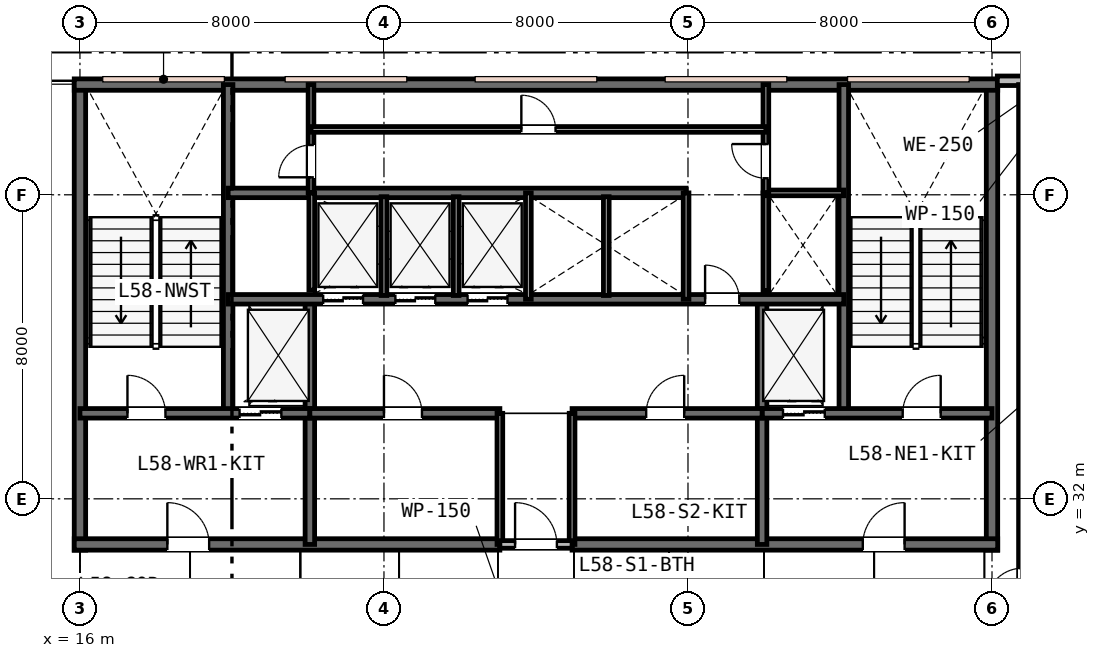
"""IFC4 building model, lengths in metres.
Left out: names, types, materials, properties, quantities, classifications, styles, units other than length and angle.
Written with IfcOpenShell. Run it as: python <this file> out.ifc"""

import sys

from ifc_helpers import new_model, si_unit, direction, frame, frame_2d, origin, place, context, subcontext, project, spatial, rectangle, extrude, element, fill, save


model = new_model("IFC4")
c1 = context("Model", 3, precision=1e-05, world=origin(), true_north=direction((0.0, 1.0)))
c2 = subcontext(c1, "Body", "Model", "MODEL_VIEW")
j1 = project(units=[si_unit("LENGTHUNIT", "METRE"), si_unit("PLANEANGLEUNIT", "RADIAN")], contexts=[c1])
p1 = place(None, origin())
s1 = spatial("IfcSite", under=j1, at=p1, CompositionType="ELEMENT")
p2 = place(p1, origin())
s2 = spatial("IfcBuilding", under=s1, at=p2, CompositionType="ELEMENT")
p3 = place(p2, frame((0.0, 0.0, 226.0)))
s3 = spatial("IfcBuildingStorey", under=s2, at=p3, CompositionType="ELEMENT", Elevation=226.0)
for number, where, z_axis, x_axis in (
    (1, (16.0, 30.65, 0.0), (0.0, 0.0, 1.0), (0.0, 1.0, 0.0)),
    (2, (40.0, 30.65, 0.0), (0.0, 0.0, 1.0), (0.0, 1.0, 0.0)),
):
    element("IfcWall", number, at=place(p3, frame(where, z_axis=z_axis, x_axis=x_axis)), inside=s3, PredefinedType="SHEAR", context=c2, shape_type="SweptSolid", body=[
        extrude(rectangle(XDim=12.3, YDim=0.3, at=frame_2d((6.15, 0.0))), origin(), (0.0, 0.0, 1.0), 3.8),
    ])
p4 = place(p3, frame((15.85, 42.9, 0.0), z_axis=(0.0, 0.0, 1.0), x_axis=(1.0, 0.0, 0.0)))
e3 = element("IfcWall", 3, at=p4, inside=s3, PredefinedType="SHEAR", context=c2, shape_type="SweptSolid", body=[
    extrude(rectangle(XDim=24.3, YDim=0.3, at=frame_2d((12.15, 0.0))), origin(), (0.0, 0.0, 1.0), 3.8),
])
p5 = place(p3, frame((15.85, 30.8, 0.0), z_axis=(0.0, 0.0, 1.0), x_axis=(1.0, 0.0, 0.0)))
e4 = element("IfcWall", 4, at=p5, inside=s3, PredefinedType="SHEAR", context=c2, shape_type="SweptSolid", body=[
    extrude(rectangle(XDim=11.2, YDim=0.3, at=frame_2d((5.6, 0.0))), origin(), (0.0, 0.0, 1.0), 3.8),
])
p6 = place(p5, frame((2.45, 0.0, 0.0)))
e5 = element("IfcOpeningElement", 5, at=p6, cuts=e4, PredefinedType="OPENING", context=c2, shape_type="SweptSolid", body=[
    extrude(rectangle(XDim=1.1, YDim=2.15, at=frame_2d((0.55, 1.075))), frame((0.0, 0.16, 0.0), z_axis=(0.0, -1.0, 0.0), x_axis=(1.0, 0.0, 0.0)), (0.0, 0.0, 1.0), 0.32),
])
p7 = place(p3, frame((28.95, 30.8, 0.0), z_axis=(0.0, 0.0, 1.0), x_axis=(1.0, 0.0, 0.0)))
e6 = element("IfcWall", 6, at=p7, inside=s3, PredefinedType="SHEAR", context=c2, shape_type="SweptSolid", body=[
    extrude(rectangle(XDim=11.2, YDim=0.3, at=frame_2d((5.6, 0.0))), origin(), (0.0, 0.0, 1.0), 3.8),
])
p8 = place(p7, frame((7.65, 0.0, 0.0)))
e7 = element("IfcOpeningElement", 7, at=p8, cuts=e6, PredefinedType="OPENING", context=c2, shape_type="SweptSolid", body=[
    extrude(rectangle(XDim=1.1, YDim=2.15, at=frame_2d((0.55, 1.075))), frame((0.0, 0.16, 0.0), z_axis=(0.0, -1.0, 0.0), x_axis=(1.0, 0.0, 0.0)), (0.0, 0.0, 1.0), 0.32),
])
for number, where, z_axis, x_axis in (
    (8, (19.9, 34.25, 0.0), (0.0, 0.0, 1.0), (0.0, 1.0, 0.0)),
    (9, (36.1, 34.25, 0.0), (0.0, 0.0, 1.0), (0.0, 1.0, 0.0)),
):
    element("IfcWall", number, at=place(p3, frame(where, z_axis=z_axis, x_axis=x_axis)), inside=s3, PredefinedType="SHEAR", context=c2, shape_type="SweptSolid", body=[
        extrude(rectangle(XDim=8.65, YDim=0.25, at=frame_2d((4.325, 0.0))), origin(), (0.0, 0.0, 1.0), 3.8),
    ])
for number, where, z_axis, x_axis in (
    (10, (22.05, 30.8, 0.0), (0.0, 0.0, 1.0), (0.0, 1.0, 0.0)),
    (11, (33.95, 30.8, 0.0), (0.0, 0.0, 1.0), (0.0, 1.0, 0.0)),
):
    element("IfcWall", number, at=place(p3, frame(where, z_axis=z_axis, x_axis=x_axis)), inside=s3, PredefinedType="SHEAR", context=c2, shape_type="SweptSolid", body=[
        extrude(rectangle(XDim=6.45, YDim=0.25, at=frame_2d((3.225, 0.0))), origin(), (0.0, 0.0, 1.0), 3.8),
    ])
p9 = place(p3, frame((16.0, 34.25, 0.0), z_axis=(0.0, 0.0, 1.0), x_axis=(1.0, 0.0, 0.0)))
e12 = element("IfcWall", 12, at=p9, inside=s3, PredefinedType="SHEAR", context=c2, shape_type="SweptSolid", body=[
    extrude(rectangle(XDim=6.05, YDim=0.25, at=frame_2d((3.025, 0.0))), origin(), (0.0, 0.0, 1.0), 3.8),
])
p10 = place(p9, frame((1.25, 0.0, 0.0)))
e13 = element("IfcOpeningElement", 13, at=p10, cuts=e12, PredefinedType="OPENING", context=c2, shape_type="SweptSolid", body=[
    extrude(rectangle(XDim=1.0, YDim=2.15, at=frame_2d((0.5, 1.075))), frame((0.0, 0.135, 0.0), z_axis=(0.0, -1.0, 0.0), x_axis=(1.0, 0.0, 0.0)), (0.0, 0.0, 1.0), 0.27),
])
p11 = place(p9, frame((4.2, 0.0, 0.0)))
e14 = element("IfcOpeningElement", 14, at=p11, cuts=e12, PredefinedType="OPENING", context=c2, shape_type="SweptSolid", body=[
    extrude(rectangle(XDim=1.1, YDim=2.15, at=frame_2d((0.55, 1.075))), frame((0.0, 0.135, 0.0), z_axis=(0.0, -1.0, 0.0), x_axis=(1.0, 0.0, 0.0)), (0.0, 0.0, 1.0), 0.27),
])
p12 = place(p3, frame((33.95, 34.25, 0.0), z_axis=(0.0, 0.0, 1.0), x_axis=(1.0, 0.0, 0.0)))
e15 = element("IfcWall", 15, at=p12, inside=s3, PredefinedType="SHEAR", context=c2, shape_type="SweptSolid", body=[
    extrude(rectangle(XDim=6.05, YDim=0.25, at=frame_2d((3.025, 0.0))), origin(), (0.0, 0.0, 1.0), 3.8),
])
p13 = place(p12, frame((3.7, 0.0, 0.0)))
e16 = element("IfcOpeningElement", 16, at=p13, cuts=e15, PredefinedType="OPENING", context=c2, shape_type="SweptSolid", body=[
    extrude(rectangle(XDim=1.0, YDim=2.15, at=frame_2d((0.5, 1.075))), frame((0.0, 0.135, 0.0), z_axis=(0.0, -1.0, 0.0), x_axis=(1.0, 0.0, 0.0)), (0.0, 0.0, 1.0), 0.27),
])
p14 = place(p12, frame((0.55, 0.0, 0.0)))
e17 = element("IfcOpeningElement", 17, at=p14, cuts=e15, PredefinedType="OPENING", context=c2, shape_type="SweptSolid", body=[
    extrude(rectangle(XDim=1.1, YDim=2.15, at=frame_2d((0.55, 1.075))), frame((0.0, 0.135, 0.0), z_axis=(0.0, -1.0, 0.0), x_axis=(1.0, 0.0, 0.0)), (0.0, 0.0, 1.0), 0.27),
])
p15 = place(p3, frame((22.05, 34.25, 0.0), z_axis=(0.0, 0.0, 1.0), x_axis=(1.0, 0.0, 0.0)))
e18 = element("IfcWall", 18, at=p15, inside=s3, PredefinedType="SHEAR", context=c2, shape_type="SweptSolid", body=[
    extrude(rectangle(XDim=5.0, YDim=0.25, at=frame_2d((2.5, 0.0))), origin(), (0.0, 0.0, 1.0), 3.8),
])
p16 = place(p15, frame((1.95, 0.0, 0.0)))
e19 = element("IfcOpeningElement", 19, at=p16, cuts=e18, PredefinedType="OPENING", context=c2, shape_type="SweptSolid", body=[
    extrude(rectangle(XDim=1.0, YDim=2.15, at=frame_2d((0.5, 1.075))), frame((0.0, 0.135, 0.0), z_axis=(0.0, -1.0, 0.0), x_axis=(1.0, 0.0, 0.0)), (0.0, 0.0, 1.0), 0.27),
])
p17 = place(p3, frame((28.95, 34.25, 0.0), z_axis=(0.0, 0.0, 1.0), x_axis=(1.0, 0.0, 0.0)))
e20 = element("IfcWall", 20, at=p17, inside=s3, PredefinedType="SHEAR", context=c2, shape_type="SweptSolid", body=[
    extrude(rectangle(XDim=5.0, YDim=0.25, at=frame_2d((2.5, 0.0))), origin(), (0.0, 0.0, 1.0), 3.8),
])
p18 = place(p17, frame((1.95, 0.0, 0.0)))
e21 = element("IfcOpeningElement", 21, at=p18, cuts=e20, PredefinedType="OPENING", context=c2, shape_type="SweptSolid", body=[
    extrude(rectangle(XDim=1.0, YDim=2.15, at=frame_2d((0.5, 1.075))), frame((0.0, 0.135, 0.0), z_axis=(0.0, -1.0, 0.0), x_axis=(1.0, 0.0, 0.0)), (0.0, 0.0, 1.0), 0.27),
])
p19 = place(p3, frame((19.9, 37.25, 0.0), z_axis=(0.0, 0.0, 1.0), x_axis=(1.0, 0.0, 0.0)))
e22 = element("IfcWall", 22, at=p19, inside=s3, PredefinedType="SHEAR", context=c2, shape_type="SweptSolid", body=[
    extrude(rectangle(XDim=16.2, YDim=0.25, at=frame_2d((8.1, 0.0))), origin(), (0.0, 0.0, 1.0), 3.8),
])
p20 = place(p19, frame((12.55, 0.0, 0.0)))
e23 = element("IfcOpeningElement", 23, at=p20, cuts=e22, PredefinedType="OPENING", context=c2, shape_type="SweptSolid", body=[
    extrude(rectangle(XDim=0.9, YDim=2.15, at=frame_2d((0.45, 1.075))), frame((0.0, 0.135, 0.0), z_axis=(0.0, -1.0, 0.0), x_axis=(1.0, 0.0, 0.0)), (0.0, 0.0, 1.0), 0.27),
])
p21 = place(p19, frame((2.5, 0.0, 0.0)))
e24 = element("IfcOpeningElement", 24, at=p21, cuts=e22, PredefinedType="OPENING", context=c2, shape_type="SweptSolid", body=[
    extrude(rectangle(XDim=1.05, YDim=2.15, at=frame_2d((0.525, 1.075))), frame((0.0, 0.135, 0.0), z_axis=(0.0, -1.0, 0.0), x_axis=(1.0, 0.0, 0.0)), (0.0, 0.0, 1.0), 0.27),
])
p22 = place(p19, frame((4.4, 0.0, 0.0)))
e25 = element("IfcOpeningElement", 25, at=p22, cuts=e22, PredefinedType="OPENING", context=c2, shape_type="SweptSolid", body=[
    extrude(rectangle(XDim=1.05, YDim=2.15, at=frame_2d((0.525, 1.075))), frame((0.0, 0.135, 0.0), z_axis=(0.0, -1.0, 0.0), x_axis=(1.0, 0.0, 0.0)), (0.0, 0.0, 1.0), 0.27),
])
p23 = place(p19, frame((6.3, 0.0, 0.0)))
e26 = element("IfcOpeningElement", 26, at=p23, cuts=e22, PredefinedType="OPENING", context=c2, shape_type="SweptSolid", body=[
    extrude(rectangle(XDim=1.05, YDim=2.15, at=frame_2d((0.525, 1.075))), frame((0.0, 0.135, 0.0), z_axis=(0.0, -1.0, 0.0), x_axis=(1.0, 0.0, 0.0)), (0.0, 0.0, 1.0), 0.27),
])
p24 = place(p3, frame((19.9, 40.05, 0.0), z_axis=(0.0, 0.0, 1.0), x_axis=(1.0, 0.0, 0.0)))
e27 = element("IfcWall", 27, at=p24, inside=s3, PredefinedType="SHEAR", context=c2, shape_type="SweptSolid", body=[
    extrude(rectangle(XDim=12.05, YDim=0.25, at=frame_2d((6.025, 0.0))), origin(), (0.0, 0.0, 1.0), 3.8),
])
p25 = place(p3, frame((43.0, 43.0, 0.0), z_axis=(0.0, 0.0, 1.0), x_axis=(-1.0, 0.0, 0.0)))
e28 = element("IfcWall", 28, at=p25, inside=s3, PredefinedType="STANDARD", context=c2, shape_type="SweptSolid", body=[
    extrude(rectangle(XDim=2.86, YDim=0.25, at=frame_2d((1.43, 0.0))), origin(), (0.0, 0.0, 1.0), 3.53),
])
p26 = place(p25, frame((0.51, 0.0, 0.85)))
e29 = element("IfcOpeningElement", 29, at=p26, cuts=e28, PredefinedType="OPENING", context=c2, shape_type="SweptSolid", body=[
    extrude(rectangle(XDim=1.2, YDim=1.6, at=frame_2d((0.6, 0.8))), frame((0.0, 0.135, 0.0), z_axis=(0.0, -1.0, 0.0), x_axis=(1.0, 0.0, 0.0)), (0.0, 0.0, 1.0), 0.27),
])
for number, where, z_axis, x_axis in (
    (30, (27.05, 30.8, 0.0), (0.0, 0.0, 1.0), (0.0, 1.0, 0.0)),
    (31, (28.95, 30.8, 0.0), (0.0, 0.0, 1.0), (0.0, 1.0, 0.0)),
):
    element("IfcWall", number, at=place(p3, frame(where, z_axis=z_axis, x_axis=x_axis)), inside=s3, PredefinedType="PLUMBINGWALL", context=c2, shape_type="SweptSolid", body=[
        extrude(rectangle(XDim=3.45, YDim=0.15, at=frame_2d((1.725, 0.0))), origin(), (0.0, 0.0, 1.0), 3.22),
    ])
p27 = place(p3, frame((27.05, 30.8, 0.0), z_axis=(0.0, 0.0, 1.0), x_axis=(1.0, 0.0, 0.0)))
e32 = element("IfcWall", 32, at=p27, inside=s3, PredefinedType="PARTITIONING", context=c2, shape_type="SweptSolid", body=[
    extrude(rectangle(XDim=1.9, YDim=0.2, at=frame_2d((0.95, 0.0))), origin(), (0.0, 0.0, 1.0), 3.22),
])
p28 = place(p27, frame((0.4, 0.0, 0.0)))
e33 = element("IfcOpeningElement", 33, at=p28, cuts=e32, PredefinedType="OPENING", context=c2, shape_type="SweptSolid", body=[
    extrude(rectangle(XDim=1.1, YDim=2.15, at=frame_2d((0.55, 1.075))), frame((0.0, 0.11, 0.0), z_axis=(0.0, -1.0, 0.0), x_axis=(1.0, 0.0, 0.0)), (0.0, 0.0, 1.0), 0.22),
])
p29 = place(p3, frame((22.1, 37.49, 0.0), z_axis=(0.0, 0.0, 1.0), x_axis=(0.0, 1.0, 0.0)))
e34 = element("IfcWall", 34, at=p29, inside=s3, PredefinedType="PLUMBINGWALL", context=c2, shape_type="SweptSolid", body=[
    extrude(rectangle(XDim=2.56, YDim=0.15, at=frame_2d((1.28, 0.0))), origin(), (0.0, 0.0, 1.0), 3.53),
])
p30 = place(p3, frame((27.8, 37.25, 0.0), z_axis=(0.0, 0.0, 1.0), x_axis=(0.0, 1.0, 0.0)))
e35 = element("IfcWall", 35, at=p30, inside=s3, PredefinedType="PLUMBINGWALL", context=c2, shape_type="SweptSolid", body=[
    extrude(rectangle(XDim=2.8, YDim=0.15, at=frame_2d((1.4, 0.0))), origin(), (0.0, 0.0, 1.0), 3.53),
])
for number, where, z_axis, x_axis in (
    (36, (24.0, 37.35, 0.0), (0.0, 0.0, 1.0), (0.0, 1.0, 0.0)),
    (37, (25.9, 37.35, 0.0), (0.0, 0.0, 1.0), (0.0, 1.0, 0.0)),
):
    element("IfcWall", number, at=place(p3, frame(where, z_axis=z_axis, x_axis=x_axis)), inside=s3, PredefinedType="PLUMBINGWALL", context=c2, shape_type="SweptSolid", body=[
        extrude(rectangle(XDim=2.6, YDim=0.15, at=frame_2d((1.3, 0.0))), origin(), (0.0, 0.0, 1.0), 3.53),
    ])
p31 = place(p3, frame((31.95, 37.25, 0.0), z_axis=(0.0, 0.0, 1.0), x_axis=(0.0, 1.0, 0.0)))
e38 = element("IfcWall", 38, at=p31, inside=s3, PredefinedType="PLUMBINGWALL", context=c2, shape_type="SweptSolid", body=[
    extrude(rectangle(XDim=2.8, YDim=0.15, at=frame_2d((1.4, 0.0))), origin(), (0.0, 0.0, 1.0), 3.53),
])
p32 = place(p3, frame((29.85, 37.35, 0.0), z_axis=(0.0, 0.0, 1.0), x_axis=(0.0, 1.0, 0.0)))
e39 = element("IfcWall", 39, at=p32, inside=s3, PredefinedType="PLUMBINGWALL", context=c2, shape_type="SweptSolid", body=[
    extrude(rectangle(XDim=2.6, YDim=0.15, at=frame_2d((1.3, 0.0))), origin(), (0.0, 0.0, 1.0), 3.53),
])
p33 = place(p3, frame((34.05, 37.473, 0.0), z_axis=(0.0, 0.0, 1.0), x_axis=(0.0, 1.0, 0.0)))
e40 = element("IfcWall", 40, at=p33, inside=s3, PredefinedType="PLUMBINGWALL", context=c2, shape_type="SweptSolid", body=[
    extrude(rectangle(XDim=2.577, YDim=0.15, at=frame_2d((1.288, 0.0))), origin(), (0.0, 0.0, 1.0), 3.53),
])
p34 = place(p3, frame((34.05, 40.05, 0.0), z_axis=(0.0, 0.0, 1.0), x_axis=(1.0, 0.0, 0.0)))
e41 = element("IfcWall", 41, at=p34, inside=s3, PredefinedType="PARTITIONING", context=c2, shape_type="SweptSolid", body=[
    extrude(rectangle(XDim=2.05, YDim=0.15, at=frame_2d((1.025, 0.0))), origin(), (0.0, 0.0, 1.0), 3.53),
])
p35 = place(p3, frame((34.05, 40.05, 0.0), z_axis=(0.0, 0.0, 1.0), x_axis=(0.0, 1.0, 0.0)))
e42 = element("IfcWall", 42, at=p35, inside=s3, PredefinedType="PARTITIONING", context=c2, shape_type="SweptSolid", body=[
    extrude(rectangle(XDim=2.85, YDim=0.15, at=frame_2d((1.425, 0.0))), origin(), (0.0, 0.0, 1.0), 3.53),
])
p36 = place(p35, frame((0.385, 0.0, 0.0)))
e43 = element("IfcOpeningElement", 43, at=p36, cuts=e42, PredefinedType="OPENING", context=c2, shape_type="SweptSolid", body=[
    extrude(rectangle(XDim=0.9, YDim=2.15, at=frame_2d((0.45, 1.075))), frame((0.0, 0.085, 0.0), z_axis=(0.0, -1.0, 0.0), x_axis=(1.0, 0.0, 0.0)), (0.0, 0.0, 1.0), 0.17),
])
p37 = place(p3, frame((22.08, 40.05, 0.0), z_axis=(0.0, 0.0, 1.0), x_axis=(0.0, 1.0, 0.0)))
e44 = element("IfcWall", 44, at=p37, inside=s3, PredefinedType="PARTITIONING", context=c2, shape_type="SweptSolid", body=[
    extrude(rectangle(XDim=2.85, YDim=0.15, at=frame_2d((1.425, 0.0))), origin(), (0.0, 0.0, 1.0), 3.53),
])
p38 = place(p37, frame((0.41, 0.0, 0.0)))
e45 = element("IfcOpeningElement", 45, at=p38, cuts=e44, PredefinedType="OPENING", context=c2, shape_type="SweptSolid", body=[
    extrude(rectangle(XDim=0.85, YDim=2.15, at=frame_2d((0.425, 1.075))), frame((0.0, 0.085, 0.0), z_axis=(0.0, -1.0, 0.0), x_axis=(1.0, 0.0, 0.0)), (0.0, 0.0, 1.0), 0.17),
])
p39 = place(p3, frame((22.08, 41.72, 0.0), z_axis=(0.0, 0.0, 1.0), x_axis=(1.0, 0.0, 0.0)))
e46 = element("IfcWall", 46, at=p39, inside=s3, PredefinedType="PARTITIONING", context=c2, shape_type="SweptSolid", body=[
    extrude(rectangle(XDim=11.97, YDim=0.15, at=frame_2d((5.985, 0.0))), origin(), (0.0, 0.0, 1.0), 3.53),
])
p40 = place(p39, frame((5.535, 0.0, 0.0)))
e47 = element("IfcOpeningElement", 47, at=p40, cuts=e46, PredefinedType="OPENING", context=c2, shape_type="SweptSolid", body=[
    extrude(rectangle(XDim=0.9, YDim=2.15, at=frame_2d((0.45, 1.075))), frame((0.0, 0.085, 0.0), z_axis=(0.0, -1.0, 0.0), x_axis=(1.0, 0.0, 0.0)), (0.0, 0.0, 1.0), 0.17),
])
p41 = place(p3, frame((40.8, 28.6, 0.0), z_axis=(0.0, 0.0, 1.0), x_axis=(0.0, 1.0, 0.0)))
e48 = element("IfcWall", 48, at=p41, inside=s3, PredefinedType="PARTITIONING", context=c2, shape_type="SweptSolid", body=[
    extrude(rectangle(XDim=14.3, YDim=0.2, at=frame_2d((7.15, 0.0))), origin(), (0.0, 0.0, 1.0), 2.92),
])
p42 = place(p41, frame((0.625, 0.0, 0.0)))
e49 = element("IfcOpeningElement", 49, at=p42, cuts=e48, PredefinedType="OPENING", context=c2, shape_type="SweptSolid", body=[
    extrude(rectangle(XDim=0.95, YDim=2.15, at=frame_2d((0.475, 1.075))), frame((0.0, 0.11, 0.0), z_axis=(0.0, -1.0, 0.0), x_axis=(1.0, 0.0, 0.0)), (0.0, 0.0, 1.0), 0.22),
])
p43 = place(p28, origin())
e50 = element("IfcDoor", 50, at=p43, inside=s3, OperationType="SINGLE_SWING_LEFT", PredefinedType="DOOR", context=c2, shape_type="SweptSolid", body=[
    extrude(rectangle(XDim=1.1, YDim=2.15, at=frame_2d((0.55, 1.075))), frame((0.0, 0.025, 0.0), z_axis=(0.0, -1.0, 0.0), x_axis=(1.0, 0.0, 0.0)), (0.0, 0.0, 1.0), 0.05),
])
fill(e33, e50)
p44 = place(p10, origin())
e51 = element("IfcDoor", 51, at=p44, inside=s3, OperationType="SINGLE_SWING_LEFT", PredefinedType="DOOR", context=c2, shape_type="SweptSolid", body=[
    extrude(rectangle(XDim=1.0, YDim=2.15, at=frame_2d((0.5, 1.075))), frame((0.0, 0.025, 0.0), z_axis=(0.0, -1.0, 0.0), x_axis=(1.0, 0.0, 0.0)), (0.0, 0.0, 1.0), 0.05),
])
fill(e13, e51)
p45 = place(p13, origin())
e52 = element("IfcDoor", 52, at=p45, inside=s3, OperationType="SINGLE_SWING_RIGHT", PredefinedType="DOOR", context=c2, shape_type="SweptSolid", body=[
    extrude(rectangle(XDim=1.0, YDim=2.15, at=frame_2d((0.5, 1.075))), frame((0.0, 0.025, 0.0), z_axis=(0.0, -1.0, 0.0), x_axis=(1.0, 0.0, 0.0)), (0.0, 0.0, 1.0), 0.05),
])
fill(e16, e52)
p46 = place(p6, origin())
e53 = element("IfcDoor", 53, at=p46, inside=s3, OperationType="SINGLE_SWING_LEFT", PredefinedType="DOOR", context=c2, shape_type="SweptSolid", body=[
    extrude(rectangle(XDim=1.1, YDim=2.15, at=frame_2d((0.55, 1.075))), frame((0.0, 0.025, 0.0), z_axis=(0.0, -1.0, 0.0), x_axis=(1.0, 0.0, 0.0)), (0.0, 0.0, 1.0), 0.05),
])
fill(e5, e53)
p47 = place(p8, origin())
e54 = element("IfcDoor", 54, at=p47, inside=s3, OperationType="SINGLE_SWING_RIGHT", PredefinedType="DOOR", context=c2, shape_type="SweptSolid", body=[
    extrude(rectangle(XDim=1.1, YDim=2.15, at=frame_2d((0.55, 1.075))), frame((0.0, 0.025, 0.0), z_axis=(0.0, -1.0, 0.0), x_axis=(1.0, 0.0, 0.0)), (0.0, 0.0, 1.0), 0.05),
])
fill(e7, e54)
p48 = place(p16, origin())
e55 = element("IfcDoor", 55, at=p48, inside=s3, OperationType="SINGLE_SWING_LEFT", PredefinedType="DOOR", context=c2, shape_type="SweptSolid", body=[
    extrude(rectangle(XDim=1.0, YDim=2.15, at=frame_2d((0.5, 1.075))), frame((0.0, 0.025, 0.0), z_axis=(0.0, -1.0, 0.0), x_axis=(1.0, 0.0, 0.0)), (0.0, 0.0, 1.0), 0.05),
])
fill(e19, e55)
p49 = place(p18, origin())
e56 = element("IfcDoor", 56, at=p49, inside=s3, OperationType="SINGLE_SWING_RIGHT", PredefinedType="DOOR", context=c2, shape_type="SweptSolid", body=[
    extrude(rectangle(XDim=1.0, YDim=2.15, at=frame_2d((0.5, 1.075))), frame((0.0, 0.025, 0.0), z_axis=(0.0, -1.0, 0.0), x_axis=(1.0, 0.0, 0.0)), (0.0, 0.0, 1.0), 0.05),
])
fill(e21, e56)
p50 = place(p20, origin())
e57 = element("IfcDoor", 57, at=p50, inside=s3, OperationType="SINGLE_SWING_LEFT", PredefinedType="DOOR", context=c2, shape_type="SweptSolid", body=[
    extrude(rectangle(XDim=0.9, YDim=2.15, at=frame_2d((0.45, 1.075))), frame((0.0, 0.025, 0.0), z_axis=(0.0, -1.0, 0.0), x_axis=(1.0, 0.0, 0.0)), (0.0, 0.0, 1.0), 0.05),
])
fill(e23, e57)
p51 = place(p36, origin())
e58 = element("IfcDoor", 58, at=p51, inside=s3, OperationType="SINGLE_SWING_RIGHT", PredefinedType="DOOR", context=c2, shape_type="SweptSolid", body=[
    extrude(rectangle(XDim=0.9, YDim=2.15, at=frame_2d((0.45, 1.075))), frame((0.0, 0.025, 0.0), z_axis=(0.0, -1.0, 0.0), x_axis=(1.0, 0.0, 0.0)), (0.0, 0.0, 1.0), 0.05),
])
fill(e43, e58)
p52 = place(p38, origin())
e59 = element("IfcDoor", 59, at=p52, inside=s3, OperationType="SINGLE_SWING_LEFT", PredefinedType="DOOR", context=c2, shape_type="SweptSolid", body=[
    extrude(rectangle(XDim=0.85, YDim=2.15, at=frame_2d((0.425, 1.075))), frame((0.0, 0.025, 0.0), z_axis=(0.0, -1.0, 0.0), x_axis=(1.0, 0.0, 0.0)), (0.0, 0.0, 1.0), 0.05),
])
fill(e45, e59)
p53 = place(p40, origin())
e60 = element("IfcDoor", 60, at=p53, inside=s3, OperationType="SINGLE_SWING_LEFT", PredefinedType="DOOR", context=c2, shape_type="SweptSolid", body=[
    extrude(rectangle(XDim=0.9, YDim=2.15, at=frame_2d((0.45, 1.075))), frame((0.0, 0.025, 0.0), z_axis=(0.0, -1.0, 0.0), x_axis=(1.0, 0.0, 0.0)), (0.0, 0.0, 1.0), 0.05),
])
fill(e47, e60)
p54 = place(p11, origin())
e61 = element("IfcDoor", 61, at=p54, inside=s3, OperationType="DOUBLE_DOOR_SLIDING", PredefinedType="DOOR", context=c2, shape_type="SweptSolid", body=[
    extrude(rectangle(XDim=1.1, YDim=2.15, at=frame_2d((0.55, 1.075))), frame((0.0, 0.025, 0.0), z_axis=(0.0, -1.0, 0.0), x_axis=(1.0, 0.0, 0.0)), (0.0, 0.0, 1.0), 0.05),
])
fill(e14, e61)
p55 = place(p14, origin())
e62 = element("IfcDoor", 62, at=p55, inside=s3, OperationType="DOUBLE_DOOR_SLIDING", PredefinedType="DOOR", context=c2, shape_type="SweptSolid", body=[
    extrude(rectangle(XDim=1.1, YDim=2.15, at=frame_2d((0.55, 1.075))), frame((0.0, 0.025, 0.0), z_axis=(0.0, -1.0, 0.0), x_axis=(1.0, 0.0, 0.0)), (0.0, 0.0, 1.0), 0.05),
])
fill(e17, e62)
p56 = place(p21, origin())
e63 = element("IfcDoor", 63, at=p56, inside=s3, OperationType="DOUBLE_DOOR_SLIDING", PredefinedType="DOOR", context=c2, shape_type="SweptSolid", body=[
    extrude(rectangle(XDim=1.05, YDim=2.15, at=frame_2d((0.525, 1.075))), frame((0.0, 0.025, 0.0), z_axis=(0.0, -1.0, 0.0), x_axis=(1.0, 0.0, 0.0)), (0.0, 0.0, 1.0), 0.05),
])
fill(e24, e63)
p57 = place(p22, origin())
e64 = element("IfcDoor", 64, at=p57, inside=s3, OperationType="DOUBLE_DOOR_SLIDING", PredefinedType="DOOR", context=c2, shape_type="SweptSolid", body=[
    extrude(rectangle(XDim=1.05, YDim=2.15, at=frame_2d((0.525, 1.075))), frame((0.0, 0.025, 0.0), z_axis=(0.0, -1.0, 0.0), x_axis=(1.0, 0.0, 0.0)), (0.0, 0.0, 1.0), 0.05),
])
fill(e25, e64)
p58 = place(p23, origin())
e65 = element("IfcDoor", 65, at=p58, inside=s3, OperationType="DOUBLE_DOOR_SLIDING", PredefinedType="DOOR", context=c2, shape_type="SweptSolid", body=[
    extrude(rectangle(XDim=1.05, YDim=2.15, at=frame_2d((0.525, 1.075))), frame((0.0, 0.025, 0.0), z_axis=(0.0, -1.0, 0.0), x_axis=(1.0, 0.0, 0.0)), (0.0, 0.0, 1.0), 0.05),
])
fill(e26, e65)
save(model, sys.argv[1])
